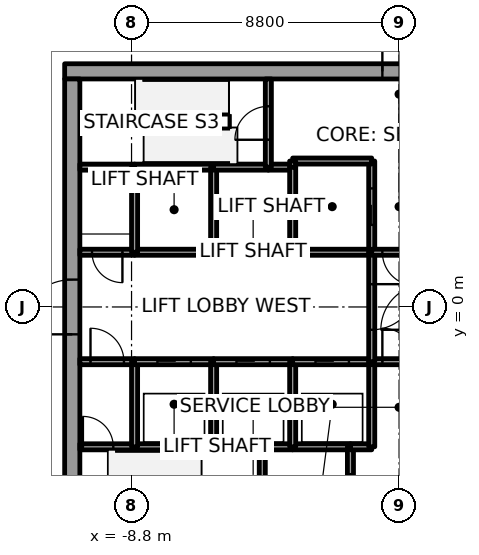
"""IFC4 building model, lengths in metres.
Left out: names, types, materials, properties, quantities, classifications, styles, units other than length and angle.
Written with IfcOpenShell. Run it as: python <this file> out.ifc"""

import sys

from ifc_helpers import new_model, si_unit, direction, frame, frame_2d, origin, place, context, subcontext, project, spatial, rectangle, extrude, element, fill, save


model = new_model("IFC4")
c1 = context("Model", 3, precision=1e-05, world=origin(), true_north=direction((0.0, 1.0)))
c2 = subcontext(c1, "Body", "Model", "MODEL_VIEW")
j1 = project(units=[si_unit("LENGTHUNIT", "METRE"), si_unit("PLANEANGLEUNIT", "RADIAN")], contexts=[c1])
p1 = place(None, origin())
s1 = spatial("IfcSite", under=j1, at=p1, CompositionType="ELEMENT")
p2 = place(p1, origin())
s2 = spatial("IfcBuilding", under=s1, at=p2, CompositionType="ELEMENT")
p3 = place(p2, frame((0.0, 0.0, 9.0)))
s3 = spatial("IfcBuildingStorey", under=s2, at=p3, CompositionType="ELEMENT", Elevation=9.0)
p4 = place(p3, frame((-11.0, 7.75, 0.0), z_axis=(0.0, 0.0, 1.0), x_axis=(1.0, 0.0, 0.0)))
e1 = element("IfcWall", 1, at=p4, inside=s3, PredefinedType="SHEAR", context=c2, shape_type="SweptSolid", body=[
    extrude(rectangle(XDim=22.0, YDim=0.5, at=frame_2d((11.0, 0.0))), origin(), (0.0, 0.0, 1.0), 7.8),
])
p5 = place(p4, frame((10.45, 0.0, 0.0)))
e2 = element("IfcOpeningElement", 2, at=p5, cuts=e1, PredefinedType="OPENING", context=c2, shape_type="SweptSolid", body=[
    extrude(rectangle(XDim=1.1, YDim=2.1, at=frame_2d((0.55, 1.05))), frame((0.0, 0.25, 0.0), z_axis=(0.0, -1.0, 0.0), x_axis=(1.0, 0.0, 0.0)), (0.0, 0.0, 1.0), 0.5),
])
p6 = place(p3, frame((-10.75, -7.5, 0.0), z_axis=(0.0, 0.0, 1.0), x_axis=(0.0, 1.0, 0.0)))
e3 = element("IfcWall", 3, at=p6, inside=s3, PredefinedType="SHEAR", context=c2, shape_type="SweptSolid", body=[
    extrude(rectangle(XDim=15.0, YDim=0.5, at=frame_2d((7.5, 0.0))), origin(), (0.0, 0.0, 1.0), 7.8),
])
p7 = place(p6, frame((6.6, 0.0, 0.0)))
e4 = element("IfcOpeningElement", 4, at=p7, cuts=e3, PredefinedType="OPENING", context=c2, shape_type="SweptSolid", body=[
    extrude(rectangle(XDim=1.8, YDim=2.1, at=frame_2d((0.9, 1.05))), frame((0.0, 0.25, 0.0), z_axis=(0.0, -1.0, 0.0), x_axis=(1.0, 0.0, 0.0)), (0.0, 0.0, 1.0), 0.5),
])
p8 = place(p3, frame((-10.5, -4.6, 0.0), z_axis=(0.0, 0.0, 1.0), x_axis=(1.0, 0.0, 0.0)))
e5 = element("IfcWall", 5, at=p8, inside=s3, PredefinedType="SOLIDWALL", context=c2, shape_type="SweptSolid", body=[
    extrude(rectangle(XDim=1.8, YDim=0.2, at=frame_2d((0.9, 0.0))), origin(), (0.0, 0.0, 1.0), 7.55),
])
p9 = place(p8, frame((0.1, 0.0, 0.0)))
e6 = element("IfcOpeningElement", 6, at=p9, cuts=e5, PredefinedType="OPENING", context=c2, shape_type="SweptSolid", body=[
    extrude(rectangle(XDim=1.0, YDim=2.1, at=frame_2d((0.5, 1.05))), frame((0.0, 0.1, 0.0), z_axis=(0.0, -1.0, 0.0), x_axis=(1.0, 0.0, 0.0)), (0.0, 0.0, 1.0), 0.2),
])
p10 = place(p3, frame((-10.5, -1.8, 0.0), z_axis=(0.0, 0.0, 1.0), x_axis=(1.0, 0.0, 0.0)))
e7 = element("IfcWall", 7, at=p10, inside=s3, PredefinedType="SOLIDWALL", context=c2, shape_type="SweptSolid", body=[
    extrude(rectangle(XDim=1.8, YDim=0.2, at=frame_2d((0.9, 0.0))), origin(), (0.0, 0.0, 1.0), 7.55),
])
p11 = place(p10, frame((0.35, 0.0, 0.0)))
e8 = element("IfcOpeningElement", 8, at=p11, cuts=e7, PredefinedType="OPENING", context=c2, shape_type="SweptSolid", body=[
    extrude(rectangle(XDim=1.1, YDim=2.4, at=frame_2d((0.55, 1.2))), frame((0.0, 0.1, 0.0), z_axis=(0.0, -1.0, 0.0), x_axis=(1.0, 0.0, 0.0)), (0.0, 0.0, 1.0), 0.2),
])
p12 = place(p3, frame((-8.7, 1.8, 0.0), z_axis=(0.0, 0.0, 1.0), x_axis=(-1.0, 0.0, 0.0)))
e9 = element("IfcWall", 9, at=p12, inside=s3, PredefinedType="SOLIDWALL", context=c2, shape_type="SweptSolid", body=[
    extrude(rectangle(XDim=1.8, YDim=0.2, at=frame_2d((0.9, 0.0))), origin(), (0.0, 0.0, 1.0), 7.55),
])
p13 = place(p12, frame((0.4, 0.0, 0.0)))
e10 = element("IfcOpeningElement", 10, at=p13, cuts=e9, PredefinedType="OPENING", context=c2, shape_type="SweptSolid", body=[
    extrude(rectangle(XDim=1.0, YDim=2.4, at=frame_2d((0.5, 1.2))), frame((0.0, 0.1, 0.0), z_axis=(0.0, -1.0, 0.0), x_axis=(1.0, 0.0, 0.0)), (0.0, 0.0, 1.0), 0.2),
])
p14 = place(p3, frame((-8.7, 4.6, 0.0), z_axis=(0.0, 0.0, 1.0), x_axis=(-1.0, 0.0, 0.0)))
e11 = element("IfcWall", 11, at=p14, inside=s3, PredefinedType="SOLIDWALL", context=c2, shape_type="SweptSolid", body=[
    extrude(rectangle(XDim=1.8, YDim=0.2, at=frame_2d((0.9, 0.0))), origin(), (0.0, 0.0, 1.0), 7.55),
])
p15 = place(p3, frame((-8.7, -4.6, 0.0), z_axis=(0.0, 0.0, 1.0), x_axis=(1.0, 0.0, 0.0)))
e12 = element("IfcWall", 12, at=p15, inside=s3, PredefinedType="SOLIDWALL", context=c2, shape_type="SweptSolid", body=[
    extrude(rectangle(XDim=2.6, YDim=0.2, at=frame_2d((1.3, 0.0))), origin(), (0.0, 0.0, 1.0), 7.55),
])
p16 = place(p3, frame((-8.7, -4.6, 0.0), z_axis=(0.0, 0.0, 1.0), x_axis=(0.0, 1.0, 0.0)))
e13 = element("IfcWall", 13, at=p16, inside=s3, PredefinedType="SOLIDWALL", context=c2, shape_type="SweptSolid", body=[
    extrude(rectangle(XDim=2.8, YDim=0.2, at=frame_2d((1.4, 0.0))), origin(), (0.0, 0.0, 1.0), 7.55),
])
p17 = place(p3, frame((-8.7, -1.8, 0.0), z_axis=(0.0, 0.0, 1.0), x_axis=(1.0, 0.0, 0.0)))
e14 = element("IfcWall", 14, at=p17, inside=s3, PredefinedType="SOLIDWALL", context=c2, shape_type="SweptSolid", body=[
    extrude(rectangle(XDim=2.6, YDim=0.2, at=frame_2d((1.3, 0.0))), origin(), (0.0, 0.0, 1.0), 7.55),
])
p18 = place(p17, frame((0.75, 0.0, 0.0)))
e15 = element("IfcOpeningElement", 15, at=p18, cuts=e14, PredefinedType="OPENING", context=c2, shape_type="SweptSolid", body=[
    extrude(rectangle(XDim=1.1, YDim=2.1, at=frame_2d((0.55, 1.05))), frame((0.0, 0.1, 0.0), z_axis=(0.0, -1.0, 0.0), x_axis=(1.0, 0.0, 0.0)), (0.0, 0.0, 1.0), 0.2),
])
p19 = place(p3, frame((-6.1, 1.8, 0.0), z_axis=(0.0, 0.0, 1.0), x_axis=(-1.0, 0.0, 0.0)))
e16 = element("IfcWall", 16, at=p19, inside=s3, PredefinedType="SOLIDWALL", context=c2, shape_type="SweptSolid", body=[
    extrude(rectangle(XDim=2.6, YDim=0.2, at=frame_2d((1.3, 0.0))), origin(), (0.0, 0.0, 1.0), 7.55),
])
p20 = place(p3, frame((-8.7, 1.8, 0.0), z_axis=(0.0, 0.0, 1.0), x_axis=(0.0, 1.0, 0.0)))
e17 = element("IfcWall", 17, at=p20, inside=s3, PredefinedType="SOLIDWALL", context=c2, shape_type="SweptSolid", body=[
    extrude(rectangle(XDim=2.8, YDim=0.2, at=frame_2d((1.4, 0.0))), origin(), (0.0, 0.0, 1.0), 7.55),
])
p21 = place(p3, frame((-6.1, 4.6, 0.0), z_axis=(0.0, 0.0, 1.0), x_axis=(-1.0, 0.0, 0.0)))
e18 = element("IfcWall", 18, at=p21, inside=s3, PredefinedType="SOLIDWALL", context=c2, shape_type="SweptSolid", body=[
    extrude(rectangle(XDim=2.6, YDim=0.2, at=frame_2d((1.3, 0.0))), origin(), (0.0, 0.0, 1.0), 7.55),
])
p22 = place(p3, frame((-6.1, -4.6, 0.0), z_axis=(0.0, 0.0, 1.0), x_axis=(1.0, 0.0, 0.0)))
e19 = element("IfcWall", 19, at=p22, inside=s3, PredefinedType="SOLIDWALL", context=c2, shape_type="SweptSolid", body=[
    extrude(rectangle(XDim=1.6, YDim=0.2, at=frame_2d((0.8, 0.0))), origin(), (0.0, 0.0, 1.0), 7.55),
])
p23 = place(p3, frame((-6.1, -4.6, 0.0), z_axis=(0.0, 0.0, 1.0), x_axis=(0.0, 1.0, 0.0)))
e20 = element("IfcWall", 20, at=p23, inside=s3, PredefinedType="SOLIDWALL", context=c2, shape_type="SweptSolid", body=[
    extrude(rectangle(XDim=2.8, YDim=0.2, at=frame_2d((1.4, 0.0))), origin(), (0.0, 0.0, 1.0), 7.55),
])
p24 = place(p3, frame((-6.1, -1.8, 0.0), z_axis=(0.0, 0.0, 1.0), x_axis=(1.0, 0.0, 0.0)))
e21 = element("IfcWall", 21, at=p24, inside=s3, PredefinedType="SOLIDWALL", context=c2, shape_type="SweptSolid", body=[
    extrude(rectangle(XDim=2.6, YDim=0.2, at=frame_2d((1.3, 0.0))), origin(), (0.0, 0.0, 1.0), 7.55),
])
p25 = place(p24, frame((0.75, 0.0, 0.0)))
e22 = element("IfcOpeningElement", 22, at=p25, cuts=e21, PredefinedType="OPENING", context=c2, shape_type="SweptSolid", body=[
    extrude(rectangle(XDim=1.1, YDim=2.1, at=frame_2d((0.55, 1.05))), frame((0.0, 0.1, 0.0), z_axis=(0.0, -1.0, 0.0), x_axis=(1.0, 0.0, 0.0)), (0.0, 0.0, 1.0), 0.2),
])
p26 = place(p3, frame((-3.5, 1.8, 0.0), z_axis=(0.0, 0.0, 1.0), x_axis=(-1.0, 0.0, 0.0)))
e23 = element("IfcWall", 23, at=p26, inside=s3, PredefinedType="SOLIDWALL", context=c2, shape_type="SweptSolid", body=[
    extrude(rectangle(XDim=2.6, YDim=0.2, at=frame_2d((1.3, 0.0))), origin(), (0.0, 0.0, 1.0), 7.55),
])
p27 = place(p3, frame((-6.1, 1.8, 0.0), z_axis=(0.0, 0.0, 1.0), x_axis=(0.0, 1.0, 0.0)))
e24 = element("IfcWall", 24, at=p27, inside=s3, PredefinedType="SOLIDWALL", context=c2, shape_type="SweptSolid", body=[
    extrude(rectangle(XDim=2.8, YDim=0.2, at=frame_2d((1.4, 0.0))), origin(), (0.0, 0.0, 1.0), 7.55),
])
p28 = place(p3, frame((-4.3, 4.6, 0.0), z_axis=(0.0, 0.0, 1.0), x_axis=(-1.0, 0.0, 0.0)))
e25 = element("IfcWall", 25, at=p28, inside=s3, PredefinedType="SOLIDWALL", context=c2, shape_type="SweptSolid", body=[
    extrude(rectangle(XDim=1.8, YDim=0.2, at=frame_2d((0.9, 0.0))), origin(), (0.0, 0.0, 1.0), 7.55),
])
p29 = place(p3, frame((-4.5, -4.6, 0.0), z_axis=(0.0, 0.0, 1.0), x_axis=(0.0, -1.0, 0.0)))
e26 = element("IfcWall", 26, at=p29, inside=s3, PredefinedType="SOLIDWALL", context=c2, shape_type="SweptSolid", body=[
    extrude(rectangle(XDim=2.9, YDim=0.2, at=frame_2d((1.45, 0.0))), origin(), (0.0, 0.0, 1.0), 7.55),
])
p30 = place(p3, frame((-4.5, -4.6, 0.0), z_axis=(0.0, 0.0, 1.0), x_axis=(1.0, 0.0, 0.0)))
e27 = element("IfcWall", 27, at=p30, inside=s3, PredefinedType="SOLIDWALL", context=c2, shape_type="SweptSolid", body=[
    extrude(rectangle(XDim=1.0, YDim=0.2, at=frame_2d((0.5, 0.0))), origin(), (0.0, 0.0, 1.0), 7.55),
])
p31 = place(p3, frame((-3.5, 4.6, 0.0), z_axis=(0.0, 0.0, 1.0), x_axis=(-1.0, 0.0, 0.0)))
e28 = element("IfcWall", 28, at=p31, inside=s3, PredefinedType="SOLIDWALL", context=c2, shape_type="SweptSolid", body=[
    extrude(rectangle(XDim=0.8, YDim=0.2, at=frame_2d((0.4, 0.0))), origin(), (0.0, 0.0, 1.0), 7.55),
])
p32 = place(p3, frame((-4.3, 4.6, 0.0), z_axis=(0.0, 0.0, 1.0), x_axis=(0.0, 1.0, 0.0)))
e29 = element("IfcWall", 29, at=p32, inside=s3, PredefinedType="SOLIDWALL", context=c2, shape_type="SweptSolid", body=[
    extrude(rectangle(XDim=2.9, YDim=0.2, at=frame_2d((1.45, 0.0))), origin(), (0.0, 0.0, 1.0), 7.55),
])
p33 = place(p32, frame((0.9, 0.0, 0.0)))
e30 = element("IfcOpeningElement", 30, at=p33, cuts=e29, PredefinedType="OPENING", context=c2, shape_type="SweptSolid", body=[
    extrude(rectangle(XDim=1.1, YDim=2.4, at=frame_2d((0.55, 1.2))), frame((0.0, 0.1, 0.0), z_axis=(0.0, -1.0, 0.0), x_axis=(1.0, 0.0, 0.0)), (0.0, 0.0, 1.0), 0.2),
])
p34 = place(p3, frame((-3.5, -4.6, 0.0), z_axis=(0.0, 0.0, 1.0), x_axis=(1.0, 0.0, 0.0)))
e31 = element("IfcWall", 31, at=p34, inside=s3, PredefinedType="SOLIDWALL", context=c2, shape_type="SweptSolid", body=[
    extrude(rectangle(XDim=1.9, YDim=0.2, at=frame_2d((0.95, 0.0))), origin(), (0.0, 0.0, 1.0), 7.55),
])
p35 = place(p3, frame((-3.5, -4.6, 0.0), z_axis=(0.0, 0.0, 1.0), x_axis=(0.0, 1.0, 0.0)))
e32 = element("IfcWall", 32, at=p35, inside=s3, PredefinedType="SOLIDWALL", context=c2, shape_type="SweptSolid", body=[
    extrude(rectangle(XDim=2.8, YDim=0.2, at=frame_2d((1.4, 0.0))), origin(), (0.0, 0.0, 1.0), 7.55),
])
p36 = place(p3, frame((-3.5, -1.8, 0.0), z_axis=(0.0, 0.0, 1.0), x_axis=(1.0, 0.0, 0.0)))
e33 = element("IfcWall", 33, at=p36, inside=s3, PredefinedType="SOLIDWALL", context=c2, shape_type="SweptSolid", body=[
    extrude(rectangle(XDim=2.6, YDim=0.2, at=frame_2d((1.3, 0.0))), origin(), (0.0, 0.0, 1.0), 7.55),
])
p37 = place(p36, frame((0.75, 0.0, 0.0)))
e34 = element("IfcOpeningElement", 34, at=p37, cuts=e33, PredefinedType="OPENING", context=c2, shape_type="SweptSolid", body=[
    extrude(rectangle(XDim=1.1, YDim=2.1, at=frame_2d((0.55, 1.05))), frame((0.0, 0.1, 0.0), z_axis=(0.0, -1.0, 0.0), x_axis=(1.0, 0.0, 0.0)), (0.0, 0.0, 1.0), 0.2),
])
p38 = place(p3, frame((-0.9, 1.8, 0.0), z_axis=(0.0, 0.0, 1.0), x_axis=(-1.0, 0.0, 0.0)))
e35 = element("IfcWall", 35, at=p38, inside=s3, PredefinedType="SOLIDWALL", context=c2, shape_type="SweptSolid", body=[
    extrude(rectangle(XDim=2.6, YDim=0.2, at=frame_2d((1.3, 0.0))), origin(), (0.0, 0.0, 1.0), 7.55),
])
p39 = place(p3, frame((-3.5, 4.6, 0.0), z_axis=(0.0, 0.0, 1.0), x_axis=(0.0, -1.0, 0.0)))
e36 = element("IfcWall", 36, at=p39, inside=s3, PredefinedType="SOLIDWALL", context=c2, shape_type="SweptSolid", body=[
    extrude(rectangle(XDim=2.8, YDim=0.2, at=frame_2d((1.4, 0.0))), origin(), (0.0, 0.0, 1.0), 7.55),
])
p40 = place(p3, frame((-0.9, 1.8, 0.0), z_axis=(0.0, 0.0, 1.0), x_axis=(0.0, 1.0, 0.0)))
e37 = element("IfcWall", 37, at=p40, inside=s3, PredefinedType="SOLIDWALL", context=c2, shape_type="SweptSolid", body=[
    extrude(rectangle(XDim=3.0, YDim=0.2, at=frame_2d((1.5, 0.0))), origin(), (0.0, 0.0, 1.0), 7.55),
])
p41 = place(p40, frame((0.9, 0.0, 0.0)))
e38 = element("IfcOpeningElement", 38, at=p41, cuts=e37, PredefinedType="OPENING", context=c2, shape_type="SweptSolid", body=[
    extrude(rectangle(XDim=1.2, YDim=2.1, at=frame_2d((0.6, 1.05))), frame((0.0, 0.1, 0.0), z_axis=(0.0, -1.0, 0.0), x_axis=(1.0, 0.0, 0.0)), (0.0, 0.0, 1.0), 0.2),
])
p42 = place(p3, frame((-0.9, 4.8, 0.0), z_axis=(0.0, 0.0, 1.0), x_axis=(-1.0, 0.0, 0.0)))
e39 = element("IfcWall", 39, at=p42, inside=s3, PredefinedType="SOLIDWALL", context=c2, shape_type="SweptSolid", body=[
    extrude(rectangle(XDim=2.6, YDim=0.2, at=frame_2d((1.3, 0.0))), origin(), (0.0, 0.0, 1.0), 7.55),
])
p43 = place(p3, frame((-3.5, 4.8, 0.0), z_axis=(0.0, 0.0, 1.0), x_axis=(0.0, -1.0, 0.0)))
e40 = element("IfcWall", 40, at=p43, inside=s3, PredefinedType="SOLIDWALL", context=c2, shape_type="SweptSolid", body=[
    extrude(rectangle(XDim=0.2, YDim=0.2, at=frame_2d((0.1, 0.0))), origin(), (0.0, 0.0, 1.0), 7.55),
])
p44 = place(p3, frame((-1.6, -7.5, 0.0), z_axis=(0.0, 0.0, 1.0), x_axis=(0.0, 1.0, 0.0)))
e41 = element("IfcWall", 41, at=p44, inside=s3, PredefinedType="SOLIDWALL", context=c2, shape_type="SweptSolid", body=[
    extrude(rectangle(XDim=2.9, YDim=0.2, at=frame_2d((1.45, 0.0))), origin(), (0.0, 0.0, 1.0), 7.55),
])
p45 = place(p44, frame((0.9, 0.0, 0.0)))
e42 = element("IfcOpeningElement", 42, at=p45, cuts=e41, PredefinedType="OPENING", context=c2, shape_type="SweptSolid", body=[
    extrude(rectangle(XDim=1.1, YDim=2.1, at=frame_2d((0.55, 1.05))), frame((0.0, 0.1, 0.0), z_axis=(0.0, -1.0, 0.0), x_axis=(1.0, 0.0, 0.0)), (0.0, 0.0, 1.0), 0.2),
])
p46 = place(p3, frame((-1.6, -4.6, 0.0), z_axis=(0.0, 0.0, 1.0), x_axis=(1.0, 0.0, 0.0)))
e43 = element("IfcWall", 43, at=p46, inside=s3, PredefinedType="SOLIDWALL", context=c2, shape_type="SweptSolid", body=[
    extrude(rectangle(XDim=0.7, YDim=0.2, at=frame_2d((0.35, 0.0))), origin(), (0.0, 0.0, 1.0), 7.55),
])
p47 = place(p3, frame((-0.9, -4.6, 0.0), z_axis=(0.0, 0.0, 1.0), x_axis=(0.0, 1.0, 0.0)))
e44 = element("IfcWall", 44, at=p47, inside=s3, PredefinedType="SOLIDWALL", context=c2, shape_type="SweptSolid", body=[
    extrude(rectangle(XDim=2.8, YDim=0.2, at=frame_2d((1.4, 0.0))), origin(), (0.0, 0.0, 1.0), 7.55),
])
p48 = place(p3, frame((-0.9, -1.8, 0.0), z_axis=(0.0, 0.0, 1.0), x_axis=(1.0, 0.0, 0.0)))
e45 = element("IfcWall", 45, at=p48, inside=s3, PredefinedType="SOLIDWALL", context=c2, shape_type="SweptSolid", body=[
    extrude(rectangle(XDim=1.8, YDim=0.2, at=frame_2d((0.9, 0.0))), origin(), (0.0, 0.0, 1.0), 7.55),
])
p49 = place(p48, frame((0.35, 0.0, 0.0)))
e46 = element("IfcOpeningElement", 46, at=p49, cuts=e45, PredefinedType="OPENING", context=c2, shape_type="SweptSolid", body=[
    extrude(rectangle(XDim=1.1, YDim=2.4, at=frame_2d((0.55, 1.2))), frame((0.0, 0.1, 0.0), z_axis=(0.0, -1.0, 0.0), x_axis=(1.0, 0.0, 0.0)), (0.0, 0.0, 1.0), 0.2),
])
p50 = place(p3, frame((-0.9, 1.8, 0.0), z_axis=(0.0, 0.0, 1.0), x_axis=(0.0, -1.0, 0.0)))
e47 = element("IfcWall", 47, at=p50, inside=s3, PredefinedType="SOLIDWALL", context=c2, shape_type="SweptSolid", body=[
    extrude(rectangle(XDim=3.6, YDim=0.2, at=frame_2d((1.8, 0.0))), origin(), (0.0, 0.0, 1.0), 7.55),
])
p51 = place(p50, frame((1.05, 0.0, 0.0)))
e48 = element("IfcOpeningElement", 48, at=p51, cuts=e47, PredefinedType="OPENING", context=c2, shape_type="SweptSolid", body=[
    extrude(rectangle(XDim=1.5, YDim=2.4, at=frame_2d((0.75, 1.2))), frame((0.0, 0.1, 0.0), z_axis=(0.0, -1.0, 0.0), x_axis=(1.0, 0.0, 0.0)), (0.0, 0.0, 1.0), 0.2),
])
p52 = place(p3, frame((0.9, 1.8, 0.0), z_axis=(0.0, 0.0, 1.0), x_axis=(-1.0, 0.0, 0.0)))
e49 = element("IfcWall", 49, at=p52, inside=s3, PredefinedType="SOLIDWALL", context=c2, shape_type="SweptSolid", body=[
    extrude(rectangle(XDim=1.8, YDim=0.2, at=frame_2d((0.9, 0.0))), origin(), (0.0, 0.0, 1.0), 7.55),
])
p53 = place(p52, frame((0.35, 0.0, 0.0)))
e50 = element("IfcOpeningElement", 50, at=p53, cuts=e49, PredefinedType="OPENING", context=c2, shape_type="SweptSolid", body=[
    extrude(rectangle(XDim=1.1, YDim=2.4, at=frame_2d((0.55, 1.2))), frame((0.0, 0.1, 0.0), z_axis=(0.0, -1.0, 0.0), x_axis=(1.0, 0.0, 0.0)), (0.0, 0.0, 1.0), 0.2),
])
p54 = place(p18, origin())
e51 = element("IfcDoor", 51, at=p54, inside=s3, OperationType="SLIDING_TO_LEFT", PredefinedType="DOOR", context=c2, shape_type="SweptSolid", body=[
    extrude(rectangle(XDim=1.1, YDim=2.1, at=frame_2d((0.55, 1.05))), frame((0.0, 0.025, 0.0), z_axis=(0.0, -1.0, 0.0), x_axis=(1.0, 0.0, 0.0)), (0.0, 0.0, 1.0), 0.05),
])
fill(e15, e51)
p55 = place(p25, origin())
e52 = element("IfcDoor", 52, at=p55, inside=s3, OperationType="SLIDING_TO_LEFT", PredefinedType="DOOR", context=c2, shape_type="SweptSolid", body=[
    extrude(rectangle(XDim=1.1, YDim=2.1, at=frame_2d((0.55, 1.05))), frame((0.0, 0.025, 0.0), z_axis=(0.0, -1.0, 0.0), x_axis=(1.0, 0.0, 0.0)), (0.0, 0.0, 1.0), 0.05),
])
fill(e22, e52)
p56 = place(p37, origin())
e53 = element("IfcDoor", 53, at=p56, inside=s3, OperationType="SLIDING_TO_RIGHT", PredefinedType="DOOR", context=c2, shape_type="SweptSolid", body=[
    extrude(rectangle(XDim=1.1, YDim=2.1, at=frame_2d((0.55, 1.05))), frame((0.0, 0.025, 0.0), z_axis=(0.0, -1.0, 0.0), x_axis=(1.0, 0.0, 0.0)), (0.0, 0.0, 1.0), 0.05),
])
fill(e34, e53)
p57 = place(p41, origin())
e54 = element("IfcDoor", 54, at=p57, inside=s3, OperationType="SLIDING_TO_LEFT", PredefinedType="DOOR", context=c2, shape_type="SweptSolid", body=[
    extrude(rectangle(XDim=1.2, YDim=2.1, at=frame_2d((0.6, 1.05))), frame((0.0, 0.025, 0.0), z_axis=(0.0, -1.0, 0.0), x_axis=(1.0, 0.0, 0.0)), (0.0, 0.0, 1.0), 0.05),
])
fill(e38, e54)
p58 = place(p51, origin())
e55 = element("IfcDoor", 55, at=p58, inside=s3, OperationType="DOUBLE_DOOR_SINGLE_SWING", PredefinedType="DOOR", context=c2, shape_type="SweptSolid", body=[
    extrude(rectangle(XDim=1.5, YDim=2.4, at=frame_2d((0.75, 1.2))), frame((0.0, 0.025, 0.0), z_axis=(0.0, -1.0, 0.0), x_axis=(1.0, 0.0, 0.0)), (0.0, 0.0, 1.0), 0.05),
])
fill(e48, e55)
p59 = place(p11, origin())
e56 = element("IfcDoor", 56, at=p59, inside=s3, OperationType="SINGLE_SWING_LEFT", PredefinedType="DOOR", context=c2, shape_type="SweptSolid", body=[
    extrude(rectangle(XDim=1.1, YDim=2.4, at=frame_2d((0.55, 1.2))), frame((0.0, 0.025, 0.0), z_axis=(0.0, -1.0, 0.0), x_axis=(1.0, 0.0, 0.0)), (0.0, 0.0, 1.0), 0.05),
])
fill(e8, e56)
p60 = place(p53, origin())
e57 = element("IfcDoor", 57, at=p60, inside=s3, OperationType="SINGLE_SWING_RIGHT", PredefinedType="DOOR", context=c2, shape_type="SweptSolid", body=[
    extrude(rectangle(XDim=1.1, YDim=2.4, at=frame_2d((0.55, 1.2))), frame((0.0, 0.025, 0.0), z_axis=(0.0, -1.0, 0.0), x_axis=(1.0, 0.0, 0.0)), (0.0, 0.0, 1.0), 0.05),
])
fill(e50, e57)
p61 = place(p49, origin())
e58 = element("IfcDoor", 58, at=p61, inside=s3, OperationType="SINGLE_SWING_RIGHT", PredefinedType="DOOR", context=c2, shape_type="SweptSolid", body=[
    extrude(rectangle(XDim=1.1, YDim=2.4, at=frame_2d((0.55, 1.2))), frame((0.0, 0.025, 0.0), z_axis=(0.0, -1.0, 0.0), x_axis=(1.0, 0.0, 0.0)), (0.0, 0.0, 1.0), 0.05),
])
fill(e46, e58)
p62 = place(p13, origin())
e59 = element("IfcDoor", 59, at=p62, inside=s3, OperationType="SINGLE_SWING_LEFT", PredefinedType="DOOR", context=c2, shape_type="SweptSolid", body=[
    extrude(rectangle(XDim=1.0, YDim=2.4, at=frame_2d((0.5, 1.2))), frame((0.0, 0.025, 0.0), z_axis=(0.0, -1.0, 0.0), x_axis=(1.0, 0.0, 0.0)), (0.0, 0.0, 1.0), 0.05),
])
fill(e10, e59)
p63 = place(p9, origin())
e60 = element("IfcDoor", 60, at=p63, inside=s3, OperationType="SINGLE_SWING_LEFT", PredefinedType="DOOR", context=c2, shape_type="SweptSolid", body=[
    extrude(rectangle(XDim=1.0, YDim=2.1, at=frame_2d((0.5, 1.05))), frame((0.0, 0.025, 0.0), z_axis=(0.0, -1.0, 0.0), x_axis=(1.0, 0.0, 0.0)), (0.0, 0.0, 1.0), 0.05),
])
fill(e6, e60)
p64 = place(p33, origin())
e61 = element("IfcDoor", 61, at=p64, inside=s3, OperationType="SINGLE_SWING_RIGHT", PredefinedType="DOOR", context=c2, shape_type="SweptSolid", body=[
    extrude(rectangle(XDim=1.1, YDim=2.4, at=frame_2d((0.55, 1.2))), frame((0.0, 0.025, 0.0), z_axis=(0.0, -1.0, 0.0), x_axis=(1.0, 0.0, 0.0)), (0.0, 0.0, 1.0), 0.05),
])
fill(e30, e61)
p65 = place(p7, origin())
e62 = element("IfcDoor", 62, at=p65, inside=s3, OperationType="DOUBLE_DOOR_SINGLE_SWING", PredefinedType="DOOR", context=c2, shape_type="SweptSolid", body=[
    extrude(rectangle(XDim=1.8, YDim=2.1, at=frame_2d((0.9, 1.05))), frame((0.0, 0.025, 0.0), z_axis=(0.0, -1.0, 0.0), x_axis=(1.0, 0.0, 0.0)), (0.0, 0.0, 1.0), 0.05),
])
fill(e4, e62)
p66 = place(p5, origin())
e63 = element("IfcDoor", 63, at=p66, inside=s3, OperationType="SINGLE_SWING_RIGHT", PredefinedType="DOOR", context=c2, shape_type="SweptSolid", body=[
    extrude(rectangle(XDim=1.1, YDim=2.1, at=frame_2d((0.55, 1.05))), frame((0.0, 0.025, 0.0), z_axis=(0.0, -1.0, 0.0), x_axis=(1.0, 0.0, 0.0)), (0.0, 0.0, 1.0), 0.05),
])
fill(e2, e63)
save(model, sys.argv[1])
